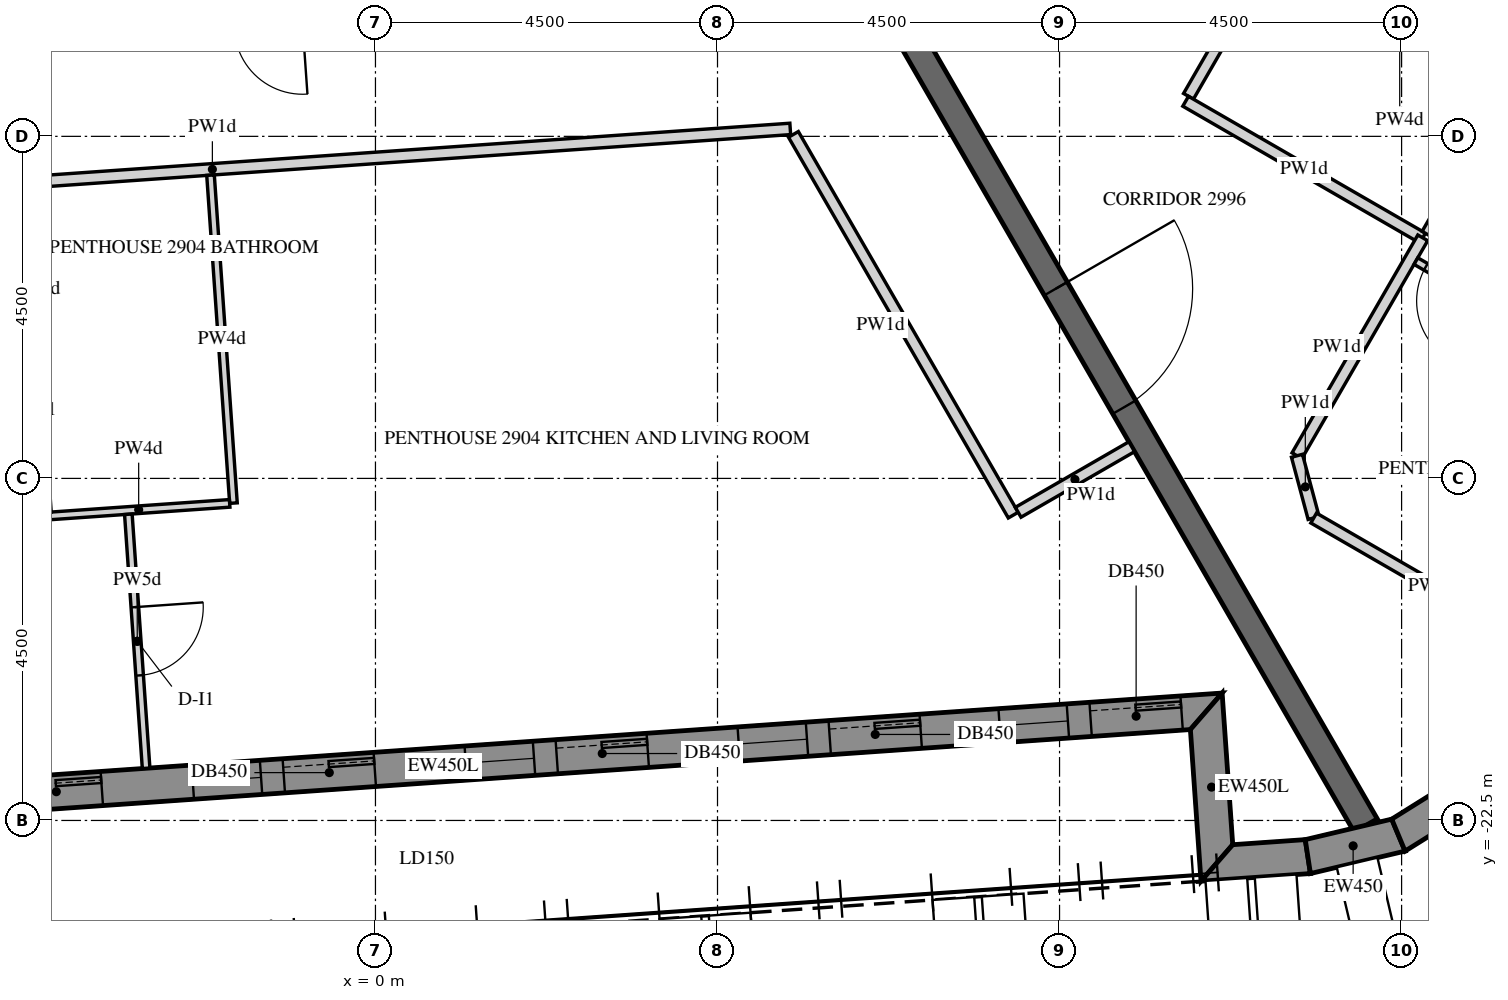
"""IFC4 building model, lengths in metres.
Left out: names, types, materials, properties, quantities, classifications, styles, units other than length and angle.
Written with IfcOpenShell. Run it as: python <this file> out.ifc"""

import sys

from ifc_helpers import new_model, si_unit, direction, frame, frame_2d, origin, place, context, subcontext, project, spatial, polyline, rectangle, outline, extrude, element, fill, save


model = new_model("IFC4")
c1 = context("Model", 3, precision=1e-05, world=origin(), true_north=direction((0.0, 1.0)))
c2 = subcontext(c1, "Body", "Model", "MODEL_VIEW")
j1 = project(units=[si_unit("LENGTHUNIT", "METRE"), si_unit("PLANEANGLEUNIT", "RADIAN")], contexts=[c1])
p1 = place(None, origin())
s1 = spatial("IfcSite", under=j1, at=p1, CompositionType="ELEMENT")
p2 = place(p1, origin())
s2 = spatial("IfcBuilding", under=s1, at=p2, CompositionType="ELEMENT")
p3 = place(p2, frame((0.0, 0.0, 369.0)))
s3 = spatial("IfcBuildingStorey", under=s2, at=p3, CompositionType="ELEMENT", Elevation=369.0)
p4 = place(p3, frame((-9.751, -22.51, -0.15), z_axis=(0.0, 0.0, 1.0), x_axis=(0.997564460173, 0.06975061147, 0.0)))
e1 = element("IfcWall", 1, at=p4, inside=s3, PredefinedType="SOLIDWALL", context=c2, shape_type="SweptSolid", body=[
    extrude(outline(polyline([(0.225, -0.225), (20.507, -0.225), (20.957, 0.225), (-0.225, 0.225), (0.225, -0.225)])), origin(), (0.0, 0.0, 1.0), 3.9),
])
p5 = place(p4, frame((0.325, 0.0, 1.05)))
e2 = element("IfcOpeningElement", 2, at=p5, cuts=e1, PredefinedType="OPENING", context=c2, shape_type="SweptSolid", body=[
    extrude(rectangle(XDim=0.9, YDim=1.5, at=frame_2d((0.45, 0.75))), frame((0.0, 0.235, 0.0), z_axis=(0.0, -1.0, 0.0), x_axis=(1.0, 0.0, 0.0)), (0.0, 0.0, 1.0), 0.47),
])
p6 = place(p4, frame((1.525, 0.0, 0.15)))
e3 = element("IfcOpeningElement", 3, at=p6, cuts=e1, PredefinedType="OPENING", context=c2, shape_type="SweptSolid", body=[
    extrude(rectangle(XDim=1.2, YDim=2.4, at=frame_2d((0.6, 1.2))), frame((0.0, 0.235, 0.0), z_axis=(0.0, -1.0, 0.0), x_axis=(1.0, 0.0, 0.0)), (0.0, 0.0, 1.0), 0.47),
])
p7 = place(p4, frame((3.766, 0.0, 1.05)))
e4 = element("IfcOpeningElement", 4, at=p7, cuts=e1, PredefinedType="OPENING", context=c2, shape_type="SweptSolid", body=[
    extrude(rectangle(XDim=0.9, YDim=1.5, at=frame_2d((0.45, 0.75))), frame((0.0, 0.235, 0.0), z_axis=(0.0, -1.0, 0.0), x_axis=(1.0, 0.0, 0.0)), (0.0, 0.0, 1.0), 0.47),
])
p8 = place(p4, frame((4.966, 0.0, 0.15)))
e5 = element("IfcOpeningElement", 5, at=p8, cuts=e1, PredefinedType="OPENING", context=c2, shape_type="SweptSolid", body=[
    extrude(rectangle(XDim=1.2, YDim=2.4, at=frame_2d((0.6, 1.2))), frame((0.0, 0.235, 0.0), z_axis=(0.0, -1.0, 0.0), x_axis=(1.0, 0.0, 0.0)), (0.0, 0.0, 1.0), 0.47),
])
p9 = place(p4, frame((7.366, 0.0, 1.05)))
e6 = element("IfcOpeningElement", 6, at=p9, cuts=e1, PredefinedType="OPENING", context=c2, shape_type="SweptSolid", body=[
    extrude(rectangle(XDim=0.9, YDim=1.5, at=frame_2d((0.45, 0.75))), frame((0.0, 0.235, 0.0), z_axis=(0.0, -1.0, 0.0), x_axis=(1.0, 0.0, 0.0)), (0.0, 0.0, 1.0), 0.47),
])
p10 = place(p4, frame((8.566, 0.0, 0.15)))
e7 = element("IfcOpeningElement", 7, at=p10, cuts=e1, PredefinedType="OPENING", context=c2, shape_type="SweptSolid", body=[
    extrude(rectangle(XDim=1.2, YDim=2.4, at=frame_2d((0.6, 1.2))), frame((0.0, 0.235, 0.0), z_axis=(0.0, -1.0, 0.0), x_axis=(1.0, 0.0, 0.0)), (0.0, 0.0, 1.0), 0.47),
])
p11 = place(p4, frame((10.966, 0.0, 1.05)))
e8 = element("IfcOpeningElement", 8, at=p11, cuts=e1, PredefinedType="OPENING", context=c2, shape_type="SweptSolid", body=[
    extrude(rectangle(XDim=0.9, YDim=1.5, at=frame_2d((0.45, 0.75))), frame((0.0, 0.235, 0.0), z_axis=(0.0, -1.0, 0.0), x_axis=(1.0, 0.0, 0.0)), (0.0, 0.0, 1.0), 0.47),
])
p12 = place(p4, frame((12.166, 0.0, 0.15)))
e9 = element("IfcOpeningElement", 9, at=p12, cuts=e1, PredefinedType="OPENING", context=c2, shape_type="SweptSolid", body=[
    extrude(rectangle(XDim=1.2, YDim=2.4, at=frame_2d((0.6, 1.2))), frame((0.0, 0.235, 0.0), z_axis=(0.0, -1.0, 0.0), x_axis=(1.0, 0.0, 0.0)), (0.0, 0.0, 1.0), 0.47),
])
p13 = place(p4, frame((14.566, 0.0, 1.05)))
e10 = element("IfcOpeningElement", 10, at=p13, cuts=e1, PredefinedType="OPENING", context=c2, shape_type="SweptSolid", body=[
    extrude(rectangle(XDim=0.9, YDim=1.5, at=frame_2d((0.45, 0.75))), frame((0.0, 0.235, 0.0), z_axis=(0.0, -1.0, 0.0), x_axis=(1.0, 0.0, 0.0)), (0.0, 0.0, 1.0), 0.47),
])
p14 = place(p4, frame((15.766, 0.0, 0.15)))
e11 = element("IfcOpeningElement", 11, at=p14, cuts=e1, PredefinedType="OPENING", context=c2, shape_type="SweptSolid", body=[
    extrude(rectangle(XDim=1.2, YDim=2.4, at=frame_2d((0.6, 1.2))), frame((0.0, 0.235, 0.0), z_axis=(0.0, -1.0, 0.0), x_axis=(1.0, 0.0, 0.0)), (0.0, 0.0, 1.0), 0.47),
])
p15 = place(p4, frame((18.007, 0.0, 1.05)))
e12 = element("IfcOpeningElement", 12, at=p15, cuts=e1, PredefinedType="OPENING", context=c2, shape_type="SweptSolid", body=[
    extrude(rectangle(XDim=0.9, YDim=1.5, at=frame_2d((0.45, 0.75))), frame((0.0, 0.235, 0.0), z_axis=(0.0, -1.0, 0.0), x_axis=(1.0, 0.0, 0.0)), (0.0, 0.0, 1.0), 0.47),
])
p16 = place(p4, frame((19.207, 0.0, 0.15)))
e13 = element("IfcOpeningElement", 13, at=p16, cuts=e1, PredefinedType="OPENING", context=c2, shape_type="SweptSolid", body=[
    extrude(rectangle(XDim=1.2, YDim=2.4, at=frame_2d((0.6, 1.2))), frame((0.0, 0.235, 0.0), z_axis=(0.0, -1.0, 0.0), x_axis=(1.0, 0.0, 0.0)), (0.0, 0.0, 1.0), 0.47),
])
p17 = place(p3, frame((10.93, -21.064, -0.15), z_axis=(0.0, 0.0, 1.0), x_axis=(0.069702791886, -0.99756780261, 0.0)))
e14 = element("IfcWall", 14, at=p17, inside=s3, PredefinedType="SOLIDWALL", context=c2, shape_type="SweptSolid", body=[
    extrude(outline(polyline([(0.225, -0.225), (2.225, -0.225), (1.775, 0.225), (-0.225, 0.225), (0.225, -0.225)])), origin(), (0.0, 0.0, 1.0), 3.9),
])
p18 = place(p3, frame((11.07, -23.059, -0.15), z_axis=(0.0, 0.0, 1.0), x_axis=(0.997562933087, 0.069772448216, 0.0)))
e15 = element("IfcWall", 15, at=p18, inside=s3, PredefinedType="SOLIDWALL", context=c2, shape_type="SweptSolid", body=[
    extrude(outline(polyline([(-0.225, -0.225), (1.219, -0.225), (1.182, 0.225), (0.225, 0.225), (-0.225, -0.225)])), origin(), (0.0, 0.0, 1.0), 3.9),
])
p19 = place(p3, frame((12.267, -22.975, -0.15), z_axis=(0.0, 0.0, 1.0), x_axis=(0.973026131006, 0.230694924913, 0.0)))
e16 = element("IfcWall", 16, at=p19, inside=s3, PredefinedType="SOLIDWALL", context=c2, shape_type="SweptSolid", body=[
    extrude(outline(polyline([(-0.018, -0.225), (1.261, -0.225), (1.188, 0.225), (0.018, 0.225), (-0.018, -0.225)])), origin(), (0.0, 0.0, 1.0), 3.9),
])
p20 = place(p3, frame((13.458, -22.693, -0.15), z_axis=(0.0, 0.0, 1.0), x_axis=(0.848009505552, 0.529981017107, 0.0)))
e17 = element("IfcWall", 17, at=p20, inside=s3, PredefinedType="SOLIDWALL", context=c2, shape_type="SweptSolid", body=[
    extrude(outline(polyline([(-0.037, -0.225), (1.261, -0.225), (1.188, 0.225), (0.037, 0.225), (-0.037, -0.225)])), origin(), (0.0, 0.0, 1.0), 3.9),
])
p21 = place(p3, frame((5.773, -10.0, -0.15), z_axis=(0.0, 0.0, 1.0), x_axis=(0.500007911273, -0.866020836161, 0.0)))
e18 = element("IfcWall", 18, at=p21, inside=s3, PredefinedType="SHEAR", context=c2, shape_type="SweptSolid", body=[
    extrude(rectangle(XDim=14.51, YDim=0.35, at=frame_2d((7.255, 0.0))), origin(), (0.0, 0.0, 1.0), 3.9),
])
p22 = place(p21, frame((6.355, 0.0, 0.15)))
e19 = element("IfcOpeningElement", 19, at=p22, cuts=e18, PredefinedType="OPENING", context=c2, shape_type="SweptSolid", body=[
    extrude(rectangle(XDim=1.8, YDim=2.4, at=frame_2d((0.9, 1.2))), frame((0.0, 0.185, 0.0), z_axis=(0.0, -1.0, 0.0), x_axis=(1.0, 0.0, 0.0)), (0.0, 0.0, 1.0), 0.37),
])
p23 = place(p3, frame((-9.749, -14.465, 0.0), z_axis=(0.0, 0.0, 1.0), x_axis=(0.997564252773, 0.069753577612, 0.0)))
e20 = element("IfcWall", 20, at=p23, inside=s3, PredefinedType="PARTITIONING", context=c2, shape_type="SweptSolid", body=[
    extrude(rectangle(XDim=15.243, YDim=0.15, at=frame_2d((7.621, 0.0))), origin(), (0.0, 0.0, 1.0), 2.47),
])
p24 = place(p23, frame((3.142, 0.0, 0.0)))
e21 = element("IfcOpeningElement", 21, at=p24, cuts=e20, PredefinedType="OPENING", context=c2, shape_type="SweptSolid", body=[
    extrude(rectangle(XDim=1.0, YDim=2.1, at=frame_2d((0.5, 1.05))), frame((0.0, 0.085, 0.0), z_axis=(0.0, -1.0, 0.0), x_axis=(1.0, 0.0, 0.0)), (0.0, 0.0, 1.0), 0.17),
])
p25 = place(p3, frame((5.499, -13.474, 0.0), z_axis=(0.0, 0.0, 1.0), x_axis=(0.500002592159, -0.866023907196, 0.0)))
e22 = element("IfcWall", 22, at=p25, inside=s3, PredefinedType="PARTITIONING", context=c2, shape_type="SweptSolid", body=[
    extrude(rectangle(XDim=5.784, YDim=0.15, at=frame_2d((2.892, 0.0))), origin(), (0.0, 0.0, 1.0), 2.47),
])
p26 = place(p3, frame((8.456, -18.446, 0.0), z_axis=(0.0, 0.0, 1.0), x_axis=(0.866013532718, 0.500020560727, 0.0)))
e23 = element("IfcWall", 23, at=p26, inside=s3, PredefinedType="PARTITIONING", context=c2, shape_type="SweptSolid", body=[
    extrude(rectangle(XDim=1.725, YDim=0.15, at=frame_2d((0.863, 0.0))), origin(), (0.0, 0.0, 1.0), 2.47),
])
p27 = place(p3, frame((6.022, -11.558, 0.0), z_axis=(0.0, 0.0, 1.0), x_axis=(-0.997564502115, -0.06975001161, 0.0)))
e24 = element("IfcWall", 24, at=p27, inside=s3, PredefinedType="PARTITIONING", context=c2, shape_type="SweptSolid", body=[
    extrude(rectangle(XDim=14.894, YDim=0.15, at=frame_2d((7.447, 0.0))), origin(), (0.0, 0.0, 1.0), 2.47),
])
p28 = place(p27, frame((6.997, 0.0, 0.0)))
e25 = element("IfcOpeningElement", 25, at=p28, cuts=e24, PredefinedType="OPENING", context=c2, shape_type="SweptSolid", body=[
    extrude(rectangle(XDim=0.9, YDim=2.1, at=frame_2d((0.45, 1.05))), frame((0.0, 0.085, 0.0), z_axis=(0.0, -1.0, 0.0), x_axis=(1.0, 0.0, 0.0)), (0.0, 0.0, 1.0), 0.17),
])
p29 = place(p3, frame((10.697, -12.973, 0.0), z_axis=(0.0, 0.0, 1.0), x_axis=(0.499991115059, 0.866030533446, 0.0)))
e26 = element("IfcWall", 26, at=p29, inside=s3, PredefinedType="PARTITIONING", context=c2, shape_type="SweptSolid", body=[
    extrude(rectangle(XDim=13.504, YDim=0.15, at=frame_2d((6.752, 0.0))), origin(), (0.0, 0.0, 1.0), 2.47),
])
p30 = place(p29, frame((3.175, 0.0, 0.0)))
e27 = element("IfcOpeningElement", 27, at=p30, cuts=e26, PredefinedType="OPENING", context=c2, shape_type="SweptSolid", body=[
    extrude(rectangle(XDim=1.0, YDim=2.1, at=frame_2d((0.5, 1.05))), frame((0.0, 0.085, 0.0), z_axis=(0.0, -1.0, 0.0), x_axis=(1.0, 0.0, 0.0)), (0.0, 0.0, 1.0), 0.17),
])
p31 = place(p3, frame((13.777, -14.838, 0.0), z_axis=(0.0, 0.0, 1.0), x_axis=(-0.866047807691, 0.499961193289, 0.0)))
e28 = element("IfcWall", 28, at=p31, inside=s3, PredefinedType="PARTITIONING", context=c2, shape_type="SweptSolid", body=[
    extrude(rectangle(XDim=3.6, YDim=0.15, at=frame_2d((1.8, 0.0))), origin(), (0.0, 0.0, 1.0), 2.47),
])
p32 = place(p3, frame((12.124, -17.701, 0.0), z_axis=(0.0, 0.0, 1.0), x_axis=(0.500018282537, 0.866014848099, 0.0)))
e29 = element("IfcWall", 29, at=p32, inside=s3, PredefinedType="PARTITIONING", context=c2, shape_type="SweptSolid", body=[
    extrude(rectangle(XDim=3.31, YDim=0.15, at=frame_2d((1.655, 0.0))), origin(), (0.0, 0.0, 1.0), 2.47),
])
p33 = place(p3, frame((12.343, -18.521, 0.0), z_axis=(0.0, 0.0, 1.0), x_axis=(-0.258846545656, 0.965918457118, 0.0)))
e30 = element("IfcWall", 30, at=p33, inside=s3, PredefinedType="PARTITIONING", context=c2, shape_type="SweptSolid", body=[
    extrude(rectangle(XDim=0.847, YDim=0.15, at=frame_2d((0.423, 0.0))), origin(), (0.0, 0.0, 1.0), 2.47),
])
p34 = place(p3, frame((15.461, -20.321, 0.0), z_axis=(0.0, 0.0, 1.0), x_axis=(-0.866030854095, 0.499990559667, 0.0)))
e31 = element("IfcWall", 31, at=p34, inside=s3, PredefinedType="PARTITIONING", context=c2, shape_type="SweptSolid", body=[
    extrude(rectangle(XDim=3.6, YDim=0.15, at=frame_2d((1.8, 0.0))), origin(), (0.0, 0.0, 1.0), 2.47),
])
p35 = place(p3, frame((-2.17, -14.01, 0.0), z_axis=(0.0, 0.0, 1.0), x_axis=(0.069770707097, -0.997563054865, 0.0)))
e32 = element("IfcWall", 32, at=p35, inside=s3, PredefinedType="PARTITIONING", context=c2, shape_type="SweptSolid", body=[
    extrude(rectangle(XDim=4.325, YDim=0.1, at=frame_2d((2.163, 0.0))), origin(), (0.0, 0.0, 1.0), 2.47),
])
p36 = place(p3, frame((-1.918, -18.328, 0.0), z_axis=(0.0, 0.0, 1.0), x_axis=(-0.997561942506, -0.06978660948, 0.0)))
e33 = element("IfcWall", 33, at=p36, inside=s3, PredefinedType="PARTITIONING", context=c2, shape_type="SweptSolid", body=[
    extrude(rectangle(XDim=2.4, YDim=0.1, at=frame_2d((1.2, 0.0))), origin(), (0.0, 0.0, 1.0), 2.47),
])
p37 = place(p3, frame((-3.251, -18.472, 0.0), z_axis=(0.0, 0.0, 1.0), x_axis=(0.069739930095, -0.997565206967, 0.0)))
e34 = element("IfcWall", 34, at=p37, inside=s3, PredefinedType="PARTITIONING", context=c2, shape_type="SweptSolid", body=[
    extrude(rectangle(XDim=3.35, YDim=0.1, at=frame_2d((1.675, 0.0))), origin(), (0.0, 0.0, 1.0), 2.47),
])
p38 = place(p37, frame((1.225, 0.0, 0.0)))
e35 = element("IfcOpeningElement", 35, at=p38, cuts=e34, PredefinedType="OPENING", context=c2, shape_type="SweptSolid", body=[
    extrude(rectangle(XDim=0.9, YDim=2.1, at=frame_2d((0.45, 1.05))), frame((0.0, 0.06, 0.0), z_axis=(0.0, -1.0, 0.0), x_axis=(1.0, 0.0, 0.0)), (0.0, 0.0, 1.0), 0.12),
])
p39 = place(p3, frame((11.949, -10.954, 0.0), z_axis=(0.0, 0.0, 1.0), x_axis=(0.866001044215, -0.500042189638, 0.0)))
e36 = element("IfcWall", 36, at=p39, inside=s3, PredefinedType="PARTITIONING", context=c2, shape_type="SweptSolid", body=[
    extrude(rectangle(XDim=3.525, YDim=0.1, at=frame_2d((1.763, 0.0))), origin(), (0.0, 0.0, 1.0), 2.47),
])
p40 = place(p39, frame((1.325, 0.0, 0.0)))
e37 = element("IfcOpeningElement", 37, at=p40, cuts=e36, PredefinedType="OPENING", context=c2, shape_type="SweptSolid", body=[
    extrude(rectangle(XDim=0.8, YDim=2.1, at=frame_2d((0.4, 1.05))), frame((0.0, 0.06, 0.0), z_axis=(0.0, -1.0, 0.0), x_axis=(1.0, 0.0, 0.0)), (0.0, 0.0, 1.0), 0.12),
])
p41 = place(p3, frame((13.813, -14.775, 0.0), z_axis=(0.0, 0.0, 1.0), x_axis=(0.500101476366, 0.86596680845, 0.0)))
e38 = element("IfcWall", 38, at=p41, inside=s3, PredefinedType="PARTITIONING", context=c2, shape_type="SweptSolid", body=[
    extrude(rectangle(XDim=2.379, YDim=0.1, at=frame_2d((1.189, 0.0))), origin(), (0.0, 0.0, 1.0), 2.47),
])
p42 = place(p3, frame((17.261, -17.204, 0.0), z_axis=(0.0, 0.0, 1.0), x_axis=(-0.866034795751, 0.499983732284, 0.0)))
e39 = element("IfcWall", 39, at=p42, inside=s3, PredefinedType="PARTITIONING", context=c2, shape_type="SweptSolid", body=[
    extrude(rectangle(XDim=4.125, YDim=0.1, at=frame_2d((2.062, 0.0))), origin(), (0.0, 0.0, 1.0), 2.47),
])
p43 = place(p42, frame((3.075, 0.0, 0.0)))
e40 = element("IfcOpeningElement", 40, at=p43, cuts=e39, PredefinedType="OPENING", context=c2, shape_type="SweptSolid", body=[
    extrude(rectangle(XDim=0.9, YDim=2.1, at=frame_2d((0.45, 1.05))), frame((0.0, 0.06, 0.0), z_axis=(0.0, -1.0, 0.0), x_axis=(1.0, 0.0, 0.0)), (0.0, 0.0, 1.0), 0.12),
])
p44 = place(p8, frame((0.0, 0.15, 0.0)))
e41 = element("IfcDoor", 41, at=p44, inside=s3, OperationType="SLIDING_TO_LEFT", PredefinedType="DOOR", context=c2, shape_type="SweptSolid", body=[
    extrude(rectangle(XDim=1.2, YDim=2.4, at=frame_2d((0.6, 1.2))), frame((0.0, 0.025, 0.0), z_axis=(0.0, -1.0, 0.0), x_axis=(1.0, 0.0, 0.0)), (0.0, 0.0, 1.0), 0.05),
])
fill(e5, e41)
p45 = place(p9, frame((0.0, 0.155, 0.0)))
e42 = element("IfcWindow", 42, at=p45, inside=s3, PartitioningType="SINGLE_PANEL", PredefinedType="WINDOW", context=c2, shape_type="SweptSolid", body=[
    extrude(rectangle(XDim=0.9, YDim=1.5, at=frame_2d((0.45, 0.75))), frame((0.0, 0.03, 0.0), z_axis=(0.0, -1.0, 0.0), x_axis=(1.0, 0.0, 0.0)), (0.0, 0.0, 1.0), 0.06),
])
fill(e6, e42)
p46 = place(p10, frame((0.0, 0.15, 0.0)))
e43 = element("IfcDoor", 43, at=p46, inside=s3, OperationType="SLIDING_TO_LEFT", PredefinedType="DOOR", context=c2, shape_type="SweptSolid", body=[
    extrude(rectangle(XDim=1.2, YDim=2.4, at=frame_2d((0.6, 1.2))), frame((0.0, 0.025, 0.0), z_axis=(0.0, -1.0, 0.0), x_axis=(1.0, 0.0, 0.0)), (0.0, 0.0, 1.0), 0.05),
])
fill(e7, e43)
p47 = place(p11, frame((0.0, 0.155, 0.0)))
e44 = element("IfcWindow", 44, at=p47, inside=s3, PartitioningType="SINGLE_PANEL", PredefinedType="WINDOW", context=c2, shape_type="SweptSolid", body=[
    extrude(rectangle(XDim=0.9, YDim=1.5, at=frame_2d((0.45, 0.75))), frame((0.0, 0.03, 0.0), z_axis=(0.0, -1.0, 0.0), x_axis=(1.0, 0.0, 0.0)), (0.0, 0.0, 1.0), 0.06),
])
fill(e8, e44)
p48 = place(p12, frame((0.0, 0.15, 0.0)))
e45 = element("IfcDoor", 45, at=p48, inside=s3, OperationType="SLIDING_TO_LEFT", PredefinedType="DOOR", context=c2, shape_type="SweptSolid", body=[
    extrude(rectangle(XDim=1.2, YDim=2.4, at=frame_2d((0.6, 1.2))), frame((0.0, 0.025, 0.0), z_axis=(0.0, -1.0, 0.0), x_axis=(1.0, 0.0, 0.0)), (0.0, 0.0, 1.0), 0.05),
])
fill(e9, e45)
p49 = place(p13, frame((0.0, 0.155, 0.0)))
e46 = element("IfcWindow", 46, at=p49, inside=s3, PartitioningType="SINGLE_PANEL", PredefinedType="WINDOW", context=c2, shape_type="SweptSolid", body=[
    extrude(rectangle(XDim=0.9, YDim=1.5, at=frame_2d((0.45, 0.75))), frame((0.0, 0.03, 0.0), z_axis=(0.0, -1.0, 0.0), x_axis=(1.0, 0.0, 0.0)), (0.0, 0.0, 1.0), 0.06),
])
fill(e10, e46)
p50 = place(p14, frame((0.0, 0.15, 0.0)))
e47 = element("IfcDoor", 47, at=p50, inside=s3, OperationType="SLIDING_TO_LEFT", PredefinedType="DOOR", context=c2, shape_type="SweptSolid", body=[
    extrude(rectangle(XDim=1.2, YDim=2.4, at=frame_2d((0.6, 1.2))), frame((0.0, 0.025, 0.0), z_axis=(0.0, -1.0, 0.0), x_axis=(1.0, 0.0, 0.0)), (0.0, 0.0, 1.0), 0.05),
])
fill(e11, e47)
p51 = place(p15, frame((0.0, 0.155, 0.0)))
e48 = element("IfcWindow", 48, at=p51, inside=s3, PartitioningType="SINGLE_PANEL", PredefinedType="WINDOW", context=c2, shape_type="SweptSolid", body=[
    extrude(rectangle(XDim=0.9, YDim=1.5, at=frame_2d((0.45, 0.75))), frame((0.0, 0.03, 0.0), z_axis=(0.0, -1.0, 0.0), x_axis=(1.0, 0.0, 0.0)), (0.0, 0.0, 1.0), 0.06),
])
fill(e12, e48)
p52 = place(p16, frame((0.0, 0.15, 0.0)))
e49 = element("IfcDoor", 49, at=p52, inside=s3, OperationType="SLIDING_TO_LEFT", PredefinedType="DOOR", context=c2, shape_type="SweptSolid", body=[
    extrude(rectangle(XDim=1.2, YDim=2.4, at=frame_2d((0.6, 1.2))), frame((0.0, 0.025, 0.0), z_axis=(0.0, -1.0, 0.0), x_axis=(1.0, 0.0, 0.0)), (0.0, 0.0, 1.0), 0.05),
])
fill(e13, e49)
p53 = place(p22, origin())
e50 = element("IfcDoor", 50, at=p53, inside=s3, OperationType="DOUBLE_DOOR_SINGLE_SWING", PredefinedType="DOOR", context=c2, shape_type="SweptSolid", body=[
    extrude(rectangle(XDim=1.8, YDim=2.4, at=frame_2d((0.9, 1.2))), frame((0.0, 0.025, 0.0), z_axis=(0.0, -1.0, 0.0), x_axis=(1.0, 0.0, 0.0)), (0.0, 0.0, 1.0), 0.05),
])
fill(e19, e50)
p54 = place(p43, origin())
e51 = element("IfcDoor", 51, at=p54, inside=s3, OperationType="SINGLE_SWING_RIGHT", PredefinedType="DOOR", context=c2, shape_type="SweptSolid", body=[
    extrude(rectangle(XDim=0.9, YDim=2.1, at=frame_2d((0.45, 1.05))), frame((0.0, 0.025, 0.0), z_axis=(0.0, -1.0, 0.0), x_axis=(1.0, 0.0, 0.0)), (0.0, 0.0, 1.0), 0.05),
])
fill(e40, e51)
p55 = place(p38, origin())
e52 = element("IfcDoor", 52, at=p55, inside=s3, OperationType="SINGLE_SWING_RIGHT", PredefinedType="DOOR", context=c2, shape_type="SweptSolid", body=[
    extrude(rectangle(XDim=0.9, YDim=2.1, at=frame_2d((0.45, 1.05))), frame((0.0, 0.025, 0.0), z_axis=(0.0, -1.0, 0.0), x_axis=(1.0, 0.0, 0.0)), (0.0, 0.0, 1.0), 0.05),
])
fill(e35, e52)
save(model, sys.argv[1])
